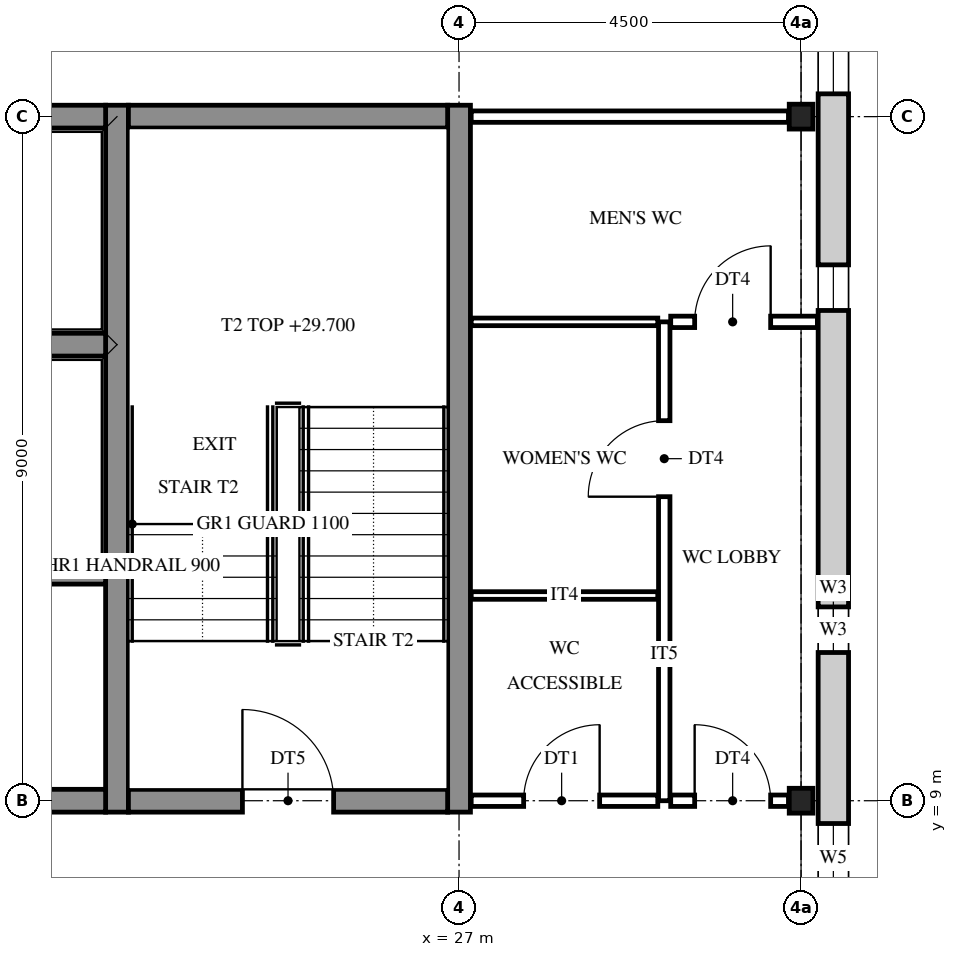
"""IFC4 building model, lengths in metres.
Left out: names, types, materials, properties, quantities, classifications, styles, units other than length and angle.
Written with IfcOpenShell. Run it as: python <this file> out.ifc"""

import sys

from ifc_helpers import new_model, si_unit, direction, frame, frame_2d, origin, origin_2d, place, context, subcontext, project, spatial, rectangle, i_section, extrude, element, fill, save


model = new_model("IFC4")
c1 = context("Model", 3, precision=1e-05, world=origin(), true_north=direction((0.0, 1.0)))
c2 = subcontext(c1, "Body", "Model", "MODEL_VIEW")
j1 = project(units=[si_unit("LENGTHUNIT", "METRE"), si_unit("PLANEANGLEUNIT", "RADIAN")], contexts=[c1])
p1 = place(None, origin())
s1 = spatial("IfcSite", under=j1, at=p1, CompositionType="ELEMENT")
p2 = place(p1, origin())
s2 = spatial("IfcBuilding", under=s1, at=p2, CompositionType="ELEMENT")
p3 = place(p2, frame((0.0, 0.0, 27.6)))
s3 = spatial("IfcBuildingStorey", under=s2, at=p3, CompositionType="ELEMENT", Elevation=27.6)
for number, where, z_axis, x_axis in (
    (1, (31.5, 9.0, 0.0), (0.0, 0.0, 1.0), (1.0, 0.0, 0.0)),
    (2, (31.5, 18.0, 0.0), (0.0, 0.0, 1.0), (1.0, 0.0, 0.0)),
):
    element("IfcColumn", number, at=place(p3, frame(where, z_axis=z_axis, x_axis=x_axis)), inside=s3, PredefinedType="COLUMN", context=c2, shape_type="SweptSolid", body=[
        extrude(i_section(OverallWidth=0.311, OverallDepth=0.327, WebThickness=0.016, FlangeThickness=0.025, FilletRadius=0.017, at=origin_2d()), origin(), (0.0, 0.0, 1.0), 4.2),
    ])
for number, where, z_axis, x_axis in (
    (3, (22.5, 8.85, 0.0), (0.0, 0.0, 1.0), (0.0, 1.0, 0.0)),
    (4, (27.0, 8.85, 0.0), (0.0, 0.0, 1.0), (0.0, 1.0, 0.0)),
):
    element("IfcWall", number, at=place(p3, frame(where, z_axis=z_axis, x_axis=x_axis)), inside=s3, PredefinedType="SHEAR", context=c2, shape_type="SweptSolid", body=[
        extrude(rectangle(XDim=9.3, YDim=0.3, at=frame_2d((4.65, 0.0))), origin(), (0.0, 0.0, 1.0), 4.2),
    ])
p4 = place(p3, frame((19.65, 9.0, 0.0), z_axis=(0.0, 0.0, 1.0), x_axis=(1.0, 0.0, 0.0)))
e5 = element("IfcWall", 5, at=p4, inside=s3, PredefinedType="SHEAR", context=c2, shape_type="SweptSolid", body=[
    extrude(rectangle(XDim=2.7, YDim=0.3, at=frame_2d((1.35, 0.0))), origin(), (0.0, 0.0, 1.0), 4.2),
])
p5 = place(p3, frame((22.65, 9.0, 0.0), z_axis=(0.0, 0.0, 1.0), x_axis=(1.0, 0.0, 0.0)))
e6 = element("IfcWall", 6, at=p5, inside=s3, PredefinedType="SHEAR", context=c2, shape_type="SweptSolid", body=[
    extrude(rectangle(XDim=4.2, YDim=0.3, at=frame_2d((2.1, 0.0))), origin(), (0.0, 0.0, 1.0), 4.2),
])
p6 = place(p5, frame((1.5, 0.0, 0.0)))
e7 = element("IfcOpeningElement", 7, at=p6, cuts=e6, PredefinedType="OPENING", context=c2, shape_type="SweptSolid", body=[
    extrude(rectangle(XDim=1.2, YDim=2.1, at=frame_2d((0.6, 1.05))), frame((0.0, 0.16, 0.0), z_axis=(0.0, -1.0, 0.0), x_axis=(1.0, 0.0, 0.0)), (0.0, 0.0, 1.0), 0.32),
])
for number, where, z_axis, x_axis in (
    (8, (19.65, 12.0, 0.0), (0.0, 0.0, 1.0), (1.0, 0.0, 0.0)),
    (9, (19.65, 15.0, 0.0), (0.0, 0.0, 1.0), (1.0, 0.0, 0.0)),
    (10, (19.65, 18.0, 0.0), (0.0, 0.0, 1.0), (1.0, 0.0, 0.0)),
):
    element("IfcWall", number, at=place(p3, frame(where, z_axis=z_axis, x_axis=x_axis)), inside=s3, PredefinedType="SHEAR", context=c2, shape_type="SweptSolid", body=[
        extrude(rectangle(XDim=2.7, YDim=0.3, at=frame_2d((1.35, 0.0))), origin(), (0.0, 0.0, 1.0), 4.2),
    ])
p7 = place(p3, frame((22.65, 18.0, 0.0), z_axis=(0.0, 0.0, 1.0), x_axis=(1.0, 0.0, 0.0)))
e11 = element("IfcWall", 11, at=p7, inside=s3, PredefinedType="SHEAR", context=c2, shape_type="SweptSolid", body=[
    extrude(rectangle(XDim=4.2, YDim=0.3, at=frame_2d((2.1, 0.0))), origin(), (0.0, 0.0, 1.0), 4.2),
])
p8 = place(p3, frame((31.925, 27.225, 0.0), z_axis=(0.0, 0.0, 1.0), x_axis=(0.0, -1.0, 0.0)))
e12 = element("IfcWall", 12, at=p8, inside=s3, PredefinedType="STANDARD", context=c2, shape_type="SweptSolid", body=[
    extrude(rectangle(XDim=27.45, YDim=0.4, at=frame_2d((13.725, 0.0))), origin(), (0.0, 0.0, 1.0), 4.2),
])
p9 = place(p8, frame((26.025, 0.0, 0.9)))
e13 = element("IfcOpeningElement", 13, at=p9, cuts=e12, PredefinedType="OPENING", context=c2, shape_type="SweptSolid", body=[
    extrude(rectangle(XDim=0.9, YDim=2.0, at=frame_2d((0.45, 1.0))), frame((0.0, 0.21, 0.0), z_axis=(0.0, -1.0, 0.0), x_axis=(1.0, 0.0, 0.0)), (0.0, 0.0, 1.0), 0.42),
])
p10 = place(p8, frame((18.525, 0.0, 0.9)))
e14 = element("IfcOpeningElement", 14, at=p10, cuts=e12, PredefinedType="OPENING", context=c2, shape_type="SweptSolid", body=[
    extrude(rectangle(XDim=0.9, YDim=2.0, at=frame_2d((0.45, 1.0))), frame((0.0, 0.21, 0.0), z_axis=(0.0, -1.0, 0.0), x_axis=(1.0, 0.0, 0.0)), (0.0, 0.0, 1.0), 0.42),
])
p11 = place(p8, frame((15.675, 0.0, 1.6)))
e15 = element("IfcOpeningElement", 15, at=p11, cuts=e12, PredefinedType="OPENING", context=c2, shape_type="SweptSolid", body=[
    extrude(rectangle(XDim=0.6, YDim=0.9, at=frame_2d((0.3, 0.45))), frame((0.0, 0.21, 0.0), z_axis=(0.0, -1.0, 0.0), x_axis=(1.0, 0.0, 0.0)), (0.0, 0.0, 1.0), 0.42),
])
p12 = place(p8, frame((11.175, 0.0, 1.6)))
e16 = element("IfcOpeningElement", 16, at=p12, cuts=e12, PredefinedType="OPENING", context=c2, shape_type="SweptSolid", body=[
    extrude(rectangle(XDim=0.6, YDim=0.9, at=frame_2d((0.3, 0.45))), frame((0.0, 0.21, 0.0), z_axis=(0.0, -1.0, 0.0), x_axis=(1.0, 0.0, 0.0)), (0.0, 0.0, 1.0), 0.42),
])
p13 = place(p8, frame((8.025, 0.0, 0.9)))
e17 = element("IfcOpeningElement", 17, at=p13, cuts=e12, PredefinedType="OPENING", context=c2, shape_type="SweptSolid", body=[
    extrude(rectangle(XDim=0.9, YDim=2.0, at=frame_2d((0.45, 1.0))), frame((0.0, 0.21, 0.0), z_axis=(0.0, -1.0, 0.0), x_axis=(1.0, 0.0, 0.0)), (0.0, 0.0, 1.0), 0.42),
])
p14 = place(p8, frame((0.525, 0.0, 0.9)))
e18 = element("IfcOpeningElement", 18, at=p14, cuts=e12, PredefinedType="OPENING", context=c2, shape_type="SweptSolid", body=[
    extrude(rectangle(XDim=0.9, YDim=2.0, at=frame_2d((0.45, 1.0))), frame((0.0, 0.21, 0.0), z_axis=(0.0, -1.0, 0.0), x_axis=(1.0, 0.0, 0.0)), (0.0, 0.0, 1.0), 0.42),
])
p15 = place(p3, frame((29.7, 9.0, 0.0), z_axis=(0.0, 0.0, 1.0), x_axis=(0.0, 1.0, 0.0)))
e19 = element("IfcWall", 19, at=p15, inside=s3, PredefinedType="PARTITIONING", context=c2, shape_type="SweptSolid", body=[
    extrude(rectangle(XDim=6.3, YDim=0.15, at=frame_2d((3.15, 0.0))), origin(), (0.0, 0.0, 1.0), 3.537),
])
p16 = place(p15, frame((4.0, 0.0, 0.0)))
e20 = element("IfcOpeningElement", 20, at=p16, cuts=e19, PredefinedType="OPENING", context=c2, shape_type="SweptSolid", body=[
    extrude(rectangle(XDim=1.0, YDim=2.1, at=frame_2d((0.5, 1.05))), frame((0.0, 0.085, 0.0), z_axis=(0.0, -1.0, 0.0), x_axis=(1.0, 0.0, 0.0)), (0.0, 0.0, 1.0), 0.17),
])
p17 = place(p3, frame((27.16, 9.0, 0.0), z_axis=(0.0, 0.0, 1.0), x_axis=(1.0, 0.0, 0.0)))
e21 = element("IfcWall", 21, at=p17, inside=s3, PredefinedType="PARTITIONING", context=c2, shape_type="SweptSolid", body=[
    extrude(rectangle(XDim=2.455, YDim=0.15, at=frame_2d((1.228, 0.0))), origin(), (0.0, 0.0, 1.0), 3.537),
])
p18 = place(p17, frame((0.69, 0.0, 0.0)))
e22 = element("IfcOpeningElement", 22, at=p18, cuts=e21, PredefinedType="OPENING", context=c2, shape_type="SweptSolid", body=[
    extrude(rectangle(XDim=1.0, YDim=2.1, at=frame_2d((0.5, 1.05))), frame((0.0, 0.085, 0.0), z_axis=(0.0, -1.0, 0.0), x_axis=(1.0, 0.0, 0.0)), (0.0, 0.0, 1.0), 0.17),
])
p19 = place(p3, frame((29.785, 9.0, 0.0), z_axis=(0.0, 0.0, 1.0), x_axis=(1.0, 0.0, 0.0)))
e23 = element("IfcWall", 23, at=p19, inside=s3, PredefinedType="PARTITIONING", context=c2, shape_type="SweptSolid", body=[
    extrude(rectangle(XDim=1.55, YDim=0.15, at=frame_2d((0.775, 0.0))), origin(), (0.0, 0.0, 1.0), 3.537),
])
p20 = place(p19, frame((0.315, 0.0, 0.0)))
e24 = element("IfcOpeningElement", 24, at=p20, cuts=e23, PredefinedType="OPENING", context=c2, shape_type="SweptSolid", body=[
    extrude(rectangle(XDim=1.0, YDim=2.1, at=frame_2d((0.5, 1.05))), frame((0.0, 0.085, 0.0), z_axis=(0.0, -1.0, 0.0), x_axis=(1.0, 0.0, 0.0)), (0.0, 0.0, 1.0), 0.17),
])
for number, where, z_axis, x_axis in (
    (25, (27.16, 11.7, 0.0), (0.0, 0.0, 1.0), (1.0, 0.0, 0.0)),
    (26, (27.16, 15.3, 0.0), (0.0, 0.0, 1.0), (1.0, 0.0, 0.0)),
):
    element("IfcWall", number, at=place(p3, frame(where, z_axis=z_axis, x_axis=x_axis)), inside=s3, PredefinedType="PARTITIONING", context=c2, shape_type="SweptSolid", body=[
        extrude(rectangle(XDim=2.455, YDim=0.1, at=frame_2d((1.228, 0.0))), origin(), (0.0, 0.0, 1.0), 3.537),
    ])
p21 = place(p3, frame((29.785, 15.3, 0.0), z_axis=(0.0, 0.0, 1.0), x_axis=(1.0, 0.0, 0.0)))
e27 = element("IfcWall", 27, at=p21, inside=s3, PredefinedType="PARTITIONING", context=c2, shape_type="SweptSolid", body=[
    extrude(rectangle(XDim=1.93, YDim=0.15, at=frame_2d((0.965, 0.0))), origin(), (0.0, 0.0, 1.0), 3.537),
])
p22 = place(p21, frame((0.315, 0.0, 0.0)))
e28 = element("IfcOpeningElement", 28, at=p22, cuts=e27, PredefinedType="OPENING", context=c2, shape_type="SweptSolid", body=[
    extrude(rectangle(XDim=1.0, YDim=2.1, at=frame_2d((0.5, 1.05))), frame((0.0, 0.085, 0.0), z_axis=(0.0, -1.0, 0.0), x_axis=(1.0, 0.0, 0.0)), (0.0, 0.0, 1.0), 0.17),
])
p23 = place(p3, frame((27.16, 18.0, 0.0), z_axis=(0.0, 0.0, 1.0), x_axis=(1.0, 0.0, 0.0)))
e29 = element("IfcWall", 29, at=p23, inside=s3, PredefinedType="PARTITIONING", context=c2, shape_type="SweptSolid", body=[
    extrude(rectangle(XDim=4.175, YDim=0.15, at=frame_2d((2.087, 0.0))), origin(), (0.0, 0.0, 1.0), 3.537),
])
p24 = place(p10, origin())
e30 = element("IfcWindow", 30, at=p24, inside=s3, PartitioningType="SINGLE_PANEL", PredefinedType="WINDOW", context=c2, shape_type="SweptSolid", body=[
    extrude(rectangle(XDim=0.9, YDim=2.0, at=frame_2d((0.45, 1.0))), frame((0.0, 0.03, 0.0), z_axis=(0.0, -1.0, 0.0), x_axis=(1.0, 0.0, 0.0)), (0.0, 0.0, 1.0), 0.06),
])
fill(e14, e30)
p25 = place(p11, origin())
e31 = element("IfcWindow", 31, at=p25, inside=s3, PartitioningType="SINGLE_PANEL", PredefinedType="WINDOW", context=c2, shape_type="SweptSolid", body=[
    extrude(rectangle(XDim=0.6, YDim=0.9, at=frame_2d((0.3, 0.45))), frame((0.0, 0.03, 0.0), z_axis=(0.0, -1.0, 0.0), x_axis=(1.0, 0.0, 0.0)), (0.0, 0.0, 1.0), 0.06),
])
fill(e15, e31)
p26 = place(p12, origin())
e32 = element("IfcWindow", 32, at=p26, inside=s3, PartitioningType="SINGLE_PANEL", PredefinedType="WINDOW", context=c2, shape_type="SweptSolid", body=[
    extrude(rectangle(XDim=0.6, YDim=0.9, at=frame_2d((0.3, 0.45))), frame((0.0, 0.03, 0.0), z_axis=(0.0, -1.0, 0.0), x_axis=(1.0, 0.0, 0.0)), (0.0, 0.0, 1.0), 0.06),
])
fill(e16, e32)
p27 = place(p13, origin())
e33 = element("IfcWindow", 33, at=p27, inside=s3, PartitioningType="SINGLE_PANEL", PredefinedType="WINDOW", context=c2, shape_type="SweptSolid", body=[
    extrude(rectangle(XDim=0.9, YDim=2.0, at=frame_2d((0.45, 1.0))), frame((0.0, 0.03, 0.0), z_axis=(0.0, -1.0, 0.0), x_axis=(1.0, 0.0, 0.0)), (0.0, 0.0, 1.0), 0.06),
])
fill(e17, e33)
p28 = place(p6, origin())
e34 = element("IfcDoor", 34, at=p28, inside=s3, OperationType="SINGLE_SWING_LEFT", PredefinedType="DOOR", context=c2, shape_type="SweptSolid", body=[
    extrude(rectangle(XDim=1.2, YDim=2.1, at=frame_2d((0.6, 1.05))), frame((0.0, 0.025, 0.0), z_axis=(0.0, -1.0, 0.0), x_axis=(1.0, 0.0, 0.0)), (0.0, 0.0, 1.0), 0.05),
])
fill(e7, e34)
p29 = place(p18, origin())
e35 = element("IfcDoor", 35, at=p29, inside=s3, OperationType="SINGLE_SWING_RIGHT", PredefinedType="DOOR", context=c2, shape_type="SweptSolid", body=[
    extrude(rectangle(XDim=1.0, YDim=2.1, at=frame_2d((0.5, 1.05))), frame((0.0, 0.025, 0.0), z_axis=(0.0, -1.0, 0.0), x_axis=(1.0, 0.0, 0.0)), (0.0, 0.0, 1.0), 0.05),
])
fill(e22, e35)
p30 = place(p16, origin())
e36 = element("IfcDoor", 36, at=p30, inside=s3, OperationType="SINGLE_SWING_LEFT", PredefinedType="DOOR", context=c2, shape_type="SweptSolid", body=[
    extrude(rectangle(XDim=1.0, YDim=2.1, at=frame_2d((0.5, 1.05))), frame((0.0, 0.025, 0.0), z_axis=(0.0, -1.0, 0.0), x_axis=(1.0, 0.0, 0.0)), (0.0, 0.0, 1.0), 0.05),
])
fill(e20, e36)
p31 = place(p22, origin())
e37 = element("IfcDoor", 37, at=p31, inside=s3, OperationType="SINGLE_SWING_RIGHT", PredefinedType="DOOR", context=c2, shape_type="SweptSolid", body=[
    extrude(rectangle(XDim=1.0, YDim=2.1, at=frame_2d((0.5, 1.05))), frame((0.0, 0.025, 0.0), z_axis=(0.0, -1.0, 0.0), x_axis=(1.0, 0.0, 0.0)), (0.0, 0.0, 1.0), 0.05),
])
fill(e28, e37)
p32 = place(p20, origin())
e38 = element("IfcDoor", 38, at=p32, inside=s3, OperationType="SINGLE_SWING_LEFT", PredefinedType="DOOR", context=c2, shape_type="SweptSolid", body=[
    extrude(rectangle(XDim=1.0, YDim=2.1, at=frame_2d((0.5, 1.05))), frame((0.0, 0.025, 0.0), z_axis=(0.0, -1.0, 0.0), x_axis=(1.0, 0.0, 0.0)), (0.0, 0.0, 1.0), 0.05),
])
fill(e24, e38)
save(model, sys.argv[1])
